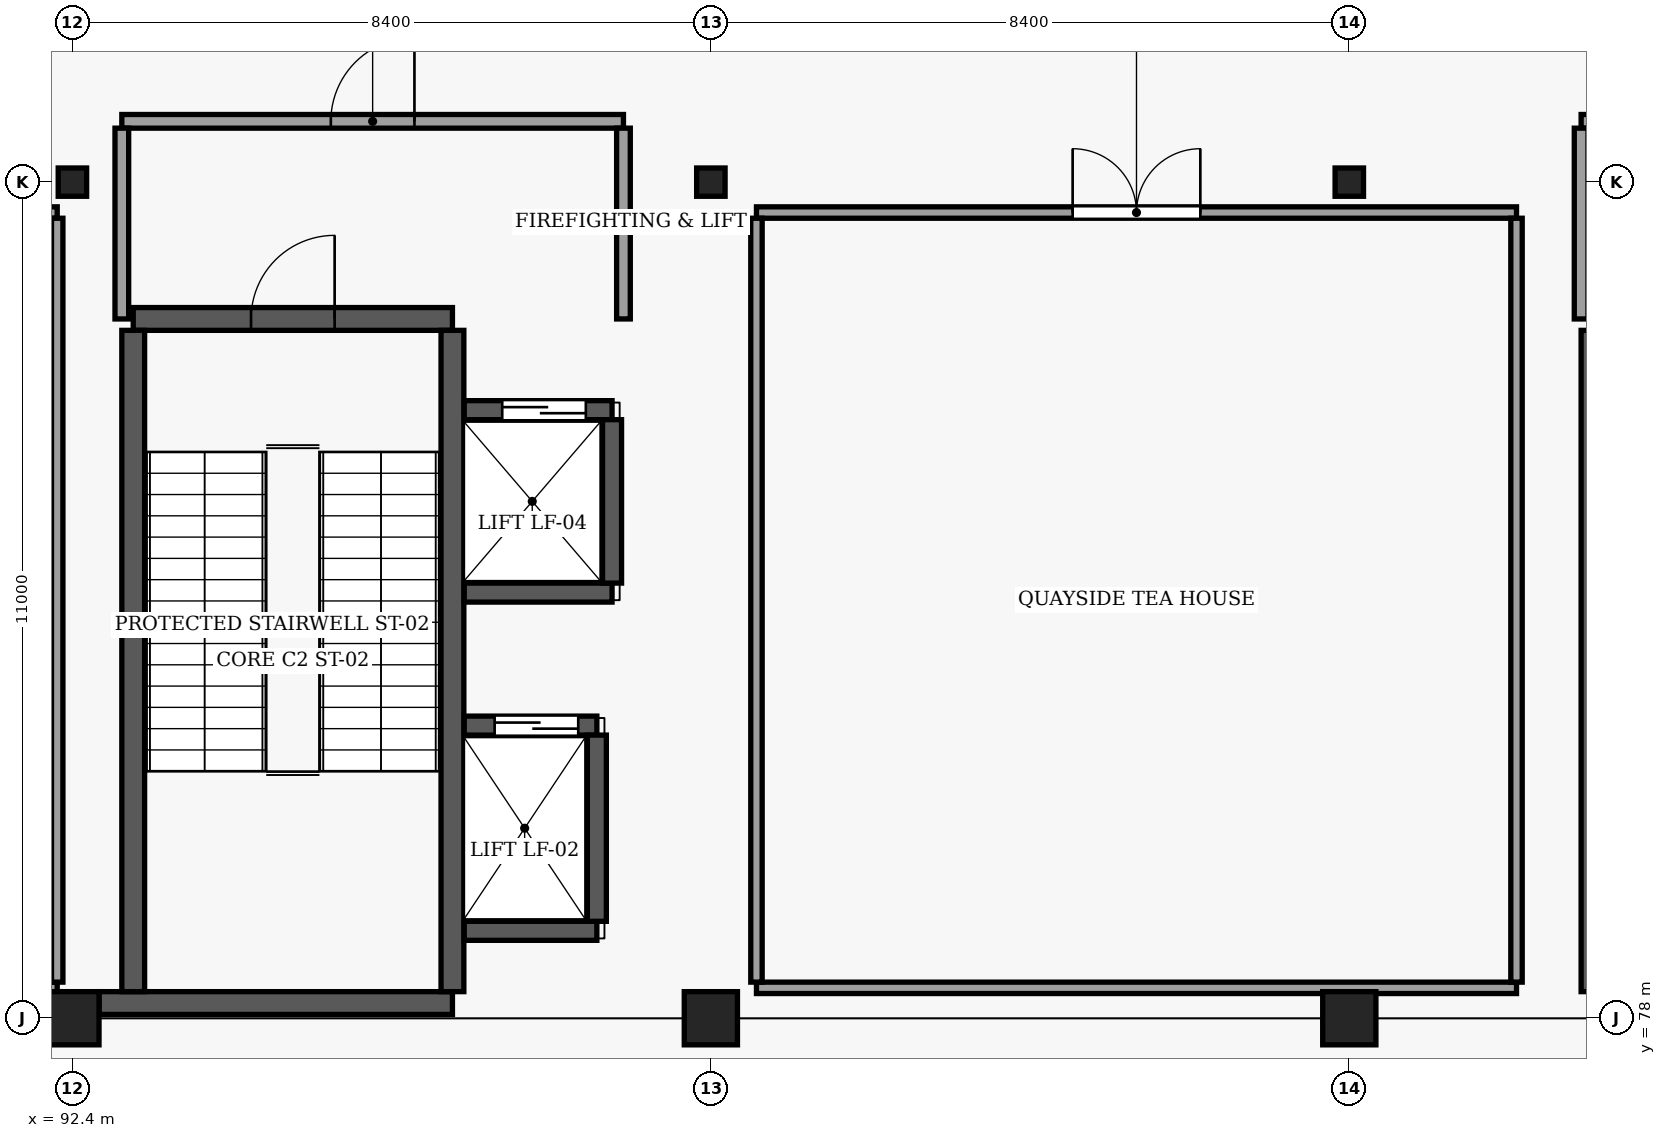
"""IFC4 building model, lengths in metres.
Left out: names, types, materials, properties, quantities, classifications, styles, units other than length and angle.
Written with IfcOpenShell. Run it as: python <this file> out.ifc"""

import sys

from ifc_helpers import new_model, si_unit, direction, frame, frame_2d, origin, origin_2d, place, context, subcontext, project, spatial, rectangle, i_section, extrude, element, fill, save


model = new_model("IFC4")
c1 = context("Model", 3, precision=1e-05, world=origin(), true_north=direction((0.0, 1.0)))
c2 = subcontext(c1, "Body", "Model", "MODEL_VIEW")
j1 = project(units=[si_unit("LENGTHUNIT", "METRE"), si_unit("PLANEANGLEUNIT", "RADIAN")], contexts=[c1])
p1 = place(None, origin())
s1 = spatial("IfcSite", under=j1, at=p1, CompositionType="ELEMENT")
p2 = place(p1, origin())
s2 = spatial("IfcBuilding", under=s1, at=p2, CompositionType="ELEMENT")
p3 = place(p2, origin())
s3 = spatial("IfcBuildingStorey", under=s2, at=p3, CompositionType="ELEMENT", Elevation=0.0)
for number, where, z_axis, x_axis in (
    (1, (92.4, 78.0, -0.45), (0.0, 0.0, 1.0), (1.0, 0.0, 0.0)),
    (2, (100.8, 78.0, -0.45), (0.0, 0.0, 1.0), (1.0, 0.0, 0.0)),
    (3, (109.2, 78.0, -0.45), (0.0, 0.0, 1.0), (1.0, 0.0, 0.0)),
):
    element("IfcColumn", number, at=place(p3, frame(where, z_axis=z_axis, x_axis=x_axis)), inside=s3, PredefinedType="COLUMN", context=c2, shape_type="SweptSolid", body=[
        extrude(rectangle(XDim=0.7, YDim=0.7, at=origin_2d()), origin(), (0.0, 0.0, 1.0), 5.57),
    ])
for number, where, z_axis, x_axis in (
    (4, (92.4, 89.0, -0.45), (0.0, 0.0, 1.0), (1.0, 0.0, 0.0)),
    (5, (100.8, 89.0, -0.45), (0.0, 0.0, 1.0), (1.0, 0.0, 0.0)),
    (6, (109.2, 89.0, -0.45), (0.0, 0.0, 1.0), (1.0, 0.0, 0.0)),
):
    element("IfcColumn", number, at=place(p3, frame(where, z_axis=z_axis, x_axis=x_axis)), inside=s3, PredefinedType="COLUMN", context=c2, shape_type="SweptSolid", body=[
        extrude(i_section(OverallWidth=0.374, OverallDepth=0.372, WebThickness=0.016, FlangeThickness=0.026, FilletRadius=0.016, at=origin_2d()), origin(), (0.0, 0.0, 1.0), 5.57),
    ])
p4 = place(p3, frame((92.75, 78.2, -0.45), z_axis=(0.0, 0.0, 1.0), x_axis=(1.0, 0.0, 0.0)))
e7 = element("IfcWall", 7, at=p4, inside=s3, PredefinedType="SHEAR", context=c2, shape_type="SweptSolid", body=[
    extrude(rectangle(XDim=4.65, YDim=0.3, at=frame_2d((2.325, 0.0))), origin(), (0.0, 0.0, 1.0), 5.57),
])
p5 = place(p3, frame((93.2, 87.2, -0.45), z_axis=(0.0, 0.0, 1.0), x_axis=(1.0, 0.0, 0.0)))
e8 = element("IfcWall", 8, at=p5, inside=s3, PredefinedType="SHEAR", context=c2, shape_type="SweptSolid", body=[
    extrude(rectangle(XDim=4.2, YDim=0.3, at=frame_2d((2.1, 0.0))), origin(), (0.0, 0.0, 1.0), 5.57),
])
p6 = place(p5, frame((1.55, 0.0, 0.45)))
e9 = element("IfcOpeningElement", 9, at=p6, cuts=e8, PredefinedType="OPENING", context=c2, shape_type="SweptSolid", body=[
    extrude(rectangle(XDim=1.1, YDim=2.2, at=frame_2d((0.55, 1.1))), frame((0.0, 0.16, 0.0), z_axis=(0.0, -1.0, 0.0), x_axis=(1.0, 0.0, 0.0)), (0.0, 0.0, 1.0), 0.32),
])
for number, where, z_axis, x_axis in (
    (10, (93.2, 78.35, -0.45), (0.0, 0.0, 1.0), (0.0, 1.0, 0.0)),
    (11, (97.4, 78.35, -0.45), (0.0, 0.0, 1.0), (0.0, 1.0, 0.0)),
):
    element("IfcWall", number, at=place(p3, frame(where, z_axis=z_axis, x_axis=x_axis)), inside=s3, PredefinedType="SHEAR", context=c2, shape_type="SweptSolid", body=[
        extrude(rectangle(XDim=8.7, YDim=0.3, at=frame_2d((4.35, 0.0))), origin(), (0.0, 0.0, 1.0), 5.57),
    ])
p7 = place(p3, frame((97.555, 79.15, -1.6), z_axis=(0.0, 0.0, 1.0), x_axis=(1.0, 0.0, 0.0)))
e12 = element("IfcWall", 12, at=p7, inside=s3, PredefinedType="SOLIDWALL", context=c2, shape_type="SweptSolid", body=[
    extrude(rectangle(XDim=1.745, YDim=0.25, at=frame_2d((0.873, 0.0))), origin(), (0.0, 0.0, 1.0), 6.72),
])
p8 = place(p3, frame((97.555, 81.85, -1.6), z_axis=(0.0, 0.0, 1.0), x_axis=(1.0, 0.0, 0.0)))
e13 = element("IfcWall", 13, at=p8, inside=s3, PredefinedType="SOLIDWALL", context=c2, shape_type="SweptSolid", body=[
    extrude(rectangle(XDim=1.745, YDim=0.25, at=frame_2d((0.873, 0.0))), origin(), (0.0, 0.0, 1.0), 6.72),
])
p9 = place(p8, frame((0.4, 0.0, 1.6)))
e14 = element("IfcOpeningElement", 14, at=p9, cuts=e13, PredefinedType="OPENING", context=c2, shape_type="SweptSolid", body=[
    extrude(rectangle(XDim=1.1, YDim=2.2, at=frame_2d((0.55, 1.1))), frame((0.0, 0.135, 0.0), z_axis=(0.0, -1.0, 0.0), x_axis=(1.0, 0.0, 0.0)), (0.0, 0.0, 1.0), 0.27),
])
p10 = place(p3, frame((99.3, 79.275, -1.6), z_axis=(0.0, 0.0, 1.0), x_axis=(0.0, 1.0, 0.0)))
e15 = element("IfcWall", 15, at=p10, inside=s3, PredefinedType="SOLIDWALL", context=c2, shape_type="SweptSolid", body=[
    extrude(rectangle(XDim=2.45, YDim=0.25, at=frame_2d((1.225, 0.0))), origin(), (0.0, 0.0, 1.0), 6.72),
])
p11 = place(p3, frame((97.555, 83.6, -1.6), z_axis=(0.0, 0.0, 1.0), x_axis=(1.0, 0.0, 0.0)))
e16 = element("IfcWall", 16, at=p11, inside=s3, PredefinedType="SOLIDWALL", context=c2, shape_type="SweptSolid", body=[
    extrude(rectangle(XDim=1.945, YDim=0.25, at=frame_2d((0.973, 0.0))), origin(), (0.0, 0.0, 1.0), 6.72),
])
p12 = place(p3, frame((97.555, 86.0, -1.6), z_axis=(0.0, 0.0, 1.0), x_axis=(1.0, 0.0, 0.0)))
e17 = element("IfcWall", 17, at=p12, inside=s3, PredefinedType="SOLIDWALL", context=c2, shape_type="SweptSolid", body=[
    extrude(rectangle(XDim=1.945, YDim=0.25, at=frame_2d((0.973, 0.0))), origin(), (0.0, 0.0, 1.0), 6.72),
])
p13 = place(p12, frame((0.5, 0.0, 1.6)))
e18 = element("IfcOpeningElement", 18, at=p13, cuts=e17, PredefinedType="OPENING", context=c2, shape_type="SweptSolid", body=[
    extrude(rectangle(XDim=1.1, YDim=2.2, at=frame_2d((0.55, 1.1))), frame((0.0, 0.135, 0.0), z_axis=(0.0, -1.0, 0.0), x_axis=(1.0, 0.0, 0.0)), (0.0, 0.0, 1.0), 0.27),
])
p14 = place(p3, frame((99.5, 83.725, -1.6), z_axis=(0.0, 0.0, 1.0), x_axis=(0.0, 1.0, 0.0)))
e19 = element("IfcWall", 19, at=p14, inside=s3, PredefinedType="SOLIDWALL", context=c2, shape_type="SweptSolid", body=[
    extrude(rectangle(XDim=2.15, YDim=0.25, at=frame_2d((1.075, 0.0))), origin(), (0.0, 0.0, 1.0), 6.72),
])
p15 = place(p3, frame((112.4, 78.35, -0.45), z_axis=(0.0, 0.0, 1.0), x_axis=(0.0, 1.0, 0.0)))
e20 = element("IfcWall", 20, at=p15, inside=s3, PredefinedType="SHEAR", context=c2, shape_type="SweptSolid", body=[
    extrude(rectangle(XDim=8.7, YDim=0.3, at=frame_2d((4.35, 0.0))), origin(), (0.0, 0.0, 1.0), 5.57),
])
p16 = place(p3, frame((93.05, 89.8, 0.0), z_axis=(0.0, 0.0, 1.0), x_axis=(1.0, 0.0, 0.0)))
e21 = element("IfcWall", 21, at=p16, inside=s3, PredefinedType="SOLIDWALL", context=c2, shape_type="SweptSolid", body=[
    extrude(rectangle(XDim=6.6, YDim=0.18, at=frame_2d((3.3, 0.0))), origin(), (0.0, 0.0, 1.0), 5.1),
])
p17 = place(p16, frame((2.75, 0.0, 0.0)))
e22 = element("IfcOpeningElement", 22, at=p17, cuts=e21, PredefinedType="OPENING", context=c2, shape_type="SweptSolid", body=[
    extrude(rectangle(XDim=1.1, YDim=2.2, at=frame_2d((0.55, 1.1))), frame((0.0, 0.1, 0.0), z_axis=(0.0, -1.0, 0.0), x_axis=(1.0, 0.0, 0.0)), (0.0, 0.0, 1.0), 0.2),
])
for number, where, z_axis, x_axis in (
    (23, (93.05, 87.2, 0.0), (0.0, 0.0, 1.0), (0.0, 1.0, 0.0)),
    (24, (99.65, 87.2, 0.0), (0.0, 0.0, 1.0), (0.0, 1.0, 0.0)),
):
    element("IfcWall", number, at=place(p3, frame(where, z_axis=z_axis, x_axis=x_axis)), inside=s3, PredefinedType="SOLIDWALL", context=c2, shape_type="SweptSolid", body=[
        extrude(rectangle(XDim=2.51, YDim=0.18, at=frame_2d((1.255, 0.0))), origin(), (0.0, 0.0, 1.0), 4.66),
    ])
p18 = place(p3, frame((112.25, 89.8, 0.0), z_axis=(0.0, 0.0, 1.0), x_axis=(1.0, 0.0, 0.0)))
e25 = element("IfcWall", 25, at=p18, inside=s3, PredefinedType="SOLIDWALL", context=c2, shape_type="SweptSolid", body=[
    extrude(rectangle(XDim=4.4, YDim=0.18, at=frame_2d((2.2, 0.0))), origin(), (0.0, 0.0, 1.0), 5.1),
])
p19 = place(p18, frame((1.65, 0.0, 0.0)))
e26 = element("IfcOpeningElement", 26, at=p19, cuts=e25, PredefinedType="OPENING", context=c2, shape_type="SweptSolid", body=[
    extrude(rectangle(XDim=1.1, YDim=2.2, at=frame_2d((0.55, 1.1))), frame((0.0, 0.1, 0.0), z_axis=(0.0, -1.0, 0.0), x_axis=(1.0, 0.0, 0.0)), (0.0, 0.0, 1.0), 0.2),
])
p20 = place(p3, frame((112.25, 87.2, 0.0), z_axis=(0.0, 0.0, 1.0), x_axis=(0.0, 1.0, 0.0)))
e27 = element("IfcWall", 27, at=p20, inside=s3, PredefinedType="SOLIDWALL", context=c2, shape_type="SweptSolid", body=[
    extrude(rectangle(XDim=2.51, YDim=0.18, at=frame_2d((1.255, 0.0))), origin(), (0.0, 0.0, 1.0), 4.66),
])
p21 = place(p3, frame((83.0, 78.4, 0.0), z_axis=(0.0, 0.0, 1.0), x_axis=(1.0, 0.0, 0.0)))
e28 = element("IfcWall", 28, at=p21, inside=s3, PredefinedType="PARTITIONING", context=c2, shape_type="SweptSolid", body=[
    extrude(rectangle(XDim=9.2, YDim=0.15, at=frame_2d((4.6, 0.0))), origin(), (0.0, 0.0, 1.0), 4.703),
])
p22 = place(p3, frame((83.0, 88.6, 0.0), z_axis=(0.0, 0.0, 1.0), x_axis=(1.0, 0.0, 0.0)))
e29 = element("IfcWall", 29, at=p22, inside=s3, PredefinedType="PARTITIONING", context=c2, shape_type="SweptSolid", body=[
    extrude(rectangle(XDim=9.2, YDim=0.15, at=frame_2d((4.6, 0.0))), origin(), (0.0, 0.0, 1.0), 4.703),
])
p23 = place(p22, frame((3.7, 0.0, 0.0)))
e30 = element("IfcOpeningElement", 30, at=p23, cuts=e29, PredefinedType="OPENING", context=c2, shape_type="SweptSolid", body=[
    extrude(rectangle(XDim=1.8, YDim=2.3, at=frame_2d((0.9, 1.15))), frame((0.0, 0.085, 0.0), z_axis=(0.0, -1.0, 0.0), x_axis=(1.0, 0.0, 0.0)), (0.0, 0.0, 1.0), 0.17),
])
p24 = place(p3, frame((92.2, 78.475, 0.0), z_axis=(0.0, 0.0, 1.0), x_axis=(0.0, 1.0, 0.0)))
e31 = element("IfcWall", 31, at=p24, inside=s3, PredefinedType="PARTITIONING", context=c2, shape_type="SweptSolid", body=[
    extrude(rectangle(XDim=10.05, YDim=0.15, at=frame_2d((5.025, 0.0))), origin(), (0.0, 0.0, 1.0), 4.703),
])
p25 = place(p3, frame((101.4, 78.4, 0.0), z_axis=(0.0, 0.0, 1.0), x_axis=(1.0, 0.0, 0.0)))
e32 = element("IfcWall", 32, at=p25, inside=s3, PredefinedType="PARTITIONING", context=c2, shape_type="SweptSolid", body=[
    extrude(rectangle(XDim=10.0, YDim=0.15, at=frame_2d((5.0, 0.0))), origin(), (0.0, 0.0, 1.0), 4.703),
])
p26 = place(p3, frame((101.4, 88.6, 0.0), z_axis=(0.0, 0.0, 1.0), x_axis=(1.0, 0.0, 0.0)))
e33 = element("IfcWall", 33, at=p26, inside=s3, PredefinedType="PARTITIONING", context=c2, shape_type="SweptSolid", body=[
    extrude(rectangle(XDim=10.0, YDim=0.15, at=frame_2d((5.0, 0.0))), origin(), (0.0, 0.0, 1.0), 4.703),
])
p27 = place(p26, frame((4.16, 0.0, 0.0)))
e34 = element("IfcOpeningElement", 34, at=p27, cuts=e33, PredefinedType="OPENING", context=c2, shape_type="SweptSolid", body=[
    extrude(rectangle(XDim=1.68, YDim=2.3, at=frame_2d((0.84, 1.15))), frame((0.0, 0.085, 0.0), z_axis=(0.0, -1.0, 0.0), x_axis=(1.0, 0.0, 0.0)), (0.0, 0.0, 1.0), 0.17),
])
p28 = place(p3, frame((101.4, 78.475, 0.0), z_axis=(0.0, 0.0, 1.0), x_axis=(0.0, 1.0, 0.0)))
e35 = element("IfcWall", 35, at=p28, inside=s3, PredefinedType="PARTITIONING", context=c2, shape_type="SweptSolid", body=[
    extrude(rectangle(XDim=10.05, YDim=0.15, at=frame_2d((5.025, 0.0))), origin(), (0.0, 0.0, 1.0), 4.807),
])
p29 = place(p3, frame((111.4, 78.475, 0.0), z_axis=(0.0, 0.0, 1.0), x_axis=(0.0, 1.0, 0.0)))
e36 = element("IfcWall", 36, at=p29, inside=s3, PredefinedType="PARTITIONING", context=c2, shape_type="SweptSolid", body=[
    extrude(rectangle(XDim=10.05, YDim=0.15, at=frame_2d((5.025, 0.0))), origin(), (0.0, 0.0, 1.0), 5.1),
])
p30 = place(p6, origin())
e37 = element("IfcDoor", 37, at=p30, inside=s3, OperationType="SINGLE_SWING_RIGHT", PredefinedType="DOOR", context=c2, shape_type="SweptSolid", body=[
    extrude(rectangle(XDim=1.1, YDim=2.2, at=frame_2d((0.55, 1.1))), frame((0.0, 0.025, 0.0), z_axis=(0.0, -1.0, 0.0), x_axis=(1.0, 0.0, 0.0)), (0.0, 0.0, 1.0), 0.05),
])
fill(e9, e37)
p31 = place(p9, origin())
e38 = element("IfcDoor", 38, at=p31, inside=s3, OperationType="SLIDING_TO_LEFT", PredefinedType="DOOR", context=c2, shape_type="SweptSolid", body=[
    extrude(rectangle(XDim=1.1, YDim=2.2, at=frame_2d((0.55, 1.1))), frame((0.0, 0.025, 0.0), z_axis=(0.0, -1.0, 0.0), x_axis=(1.0, 0.0, 0.0)), (0.0, 0.0, 1.0), 0.05),
])
fill(e14, e38)
p32 = place(p13, origin())
e39 = element("IfcDoor", 39, at=p32, inside=s3, OperationType="SLIDING_TO_LEFT", PredefinedType="DOOR", context=c2, shape_type="SweptSolid", body=[
    extrude(rectangle(XDim=1.1, YDim=2.2, at=frame_2d((0.55, 1.1))), frame((0.0, 0.025, 0.0), z_axis=(0.0, -1.0, 0.0), x_axis=(1.0, 0.0, 0.0)), (0.0, 0.0, 1.0), 0.05),
])
fill(e18, e39)
p33 = place(p17, origin())
e40 = element("IfcDoor", 40, at=p33, inside=s3, OperationType="SINGLE_SWING_RIGHT", PredefinedType="DOOR", context=c2, shape_type="SweptSolid", body=[
    extrude(rectangle(XDim=1.1, YDim=2.2, at=frame_2d((0.55, 1.1))), frame((0.0, 0.025, 0.0), z_axis=(0.0, -1.0, 0.0), x_axis=(1.0, 0.0, 0.0)), (0.0, 0.0, 1.0), 0.05),
])
fill(e22, e40)
p34 = place(p27, origin())
e41 = element("IfcDoor", 41, at=p34, inside=s3, OperationType="DOUBLE_DOOR_SINGLE_SWING", PredefinedType="DOOR", context=c2, shape_type="SweptSolid", body=[
    extrude(rectangle(XDim=1.68, YDim=2.3, at=frame_2d((0.84, 1.15))), frame((0.0, 0.025, 0.0), z_axis=(0.0, -1.0, 0.0), x_axis=(1.0, 0.0, 0.0)), (0.0, 0.0, 1.0), 0.05),
])
fill(e34, e41)
save(model, sys.argv[1])
